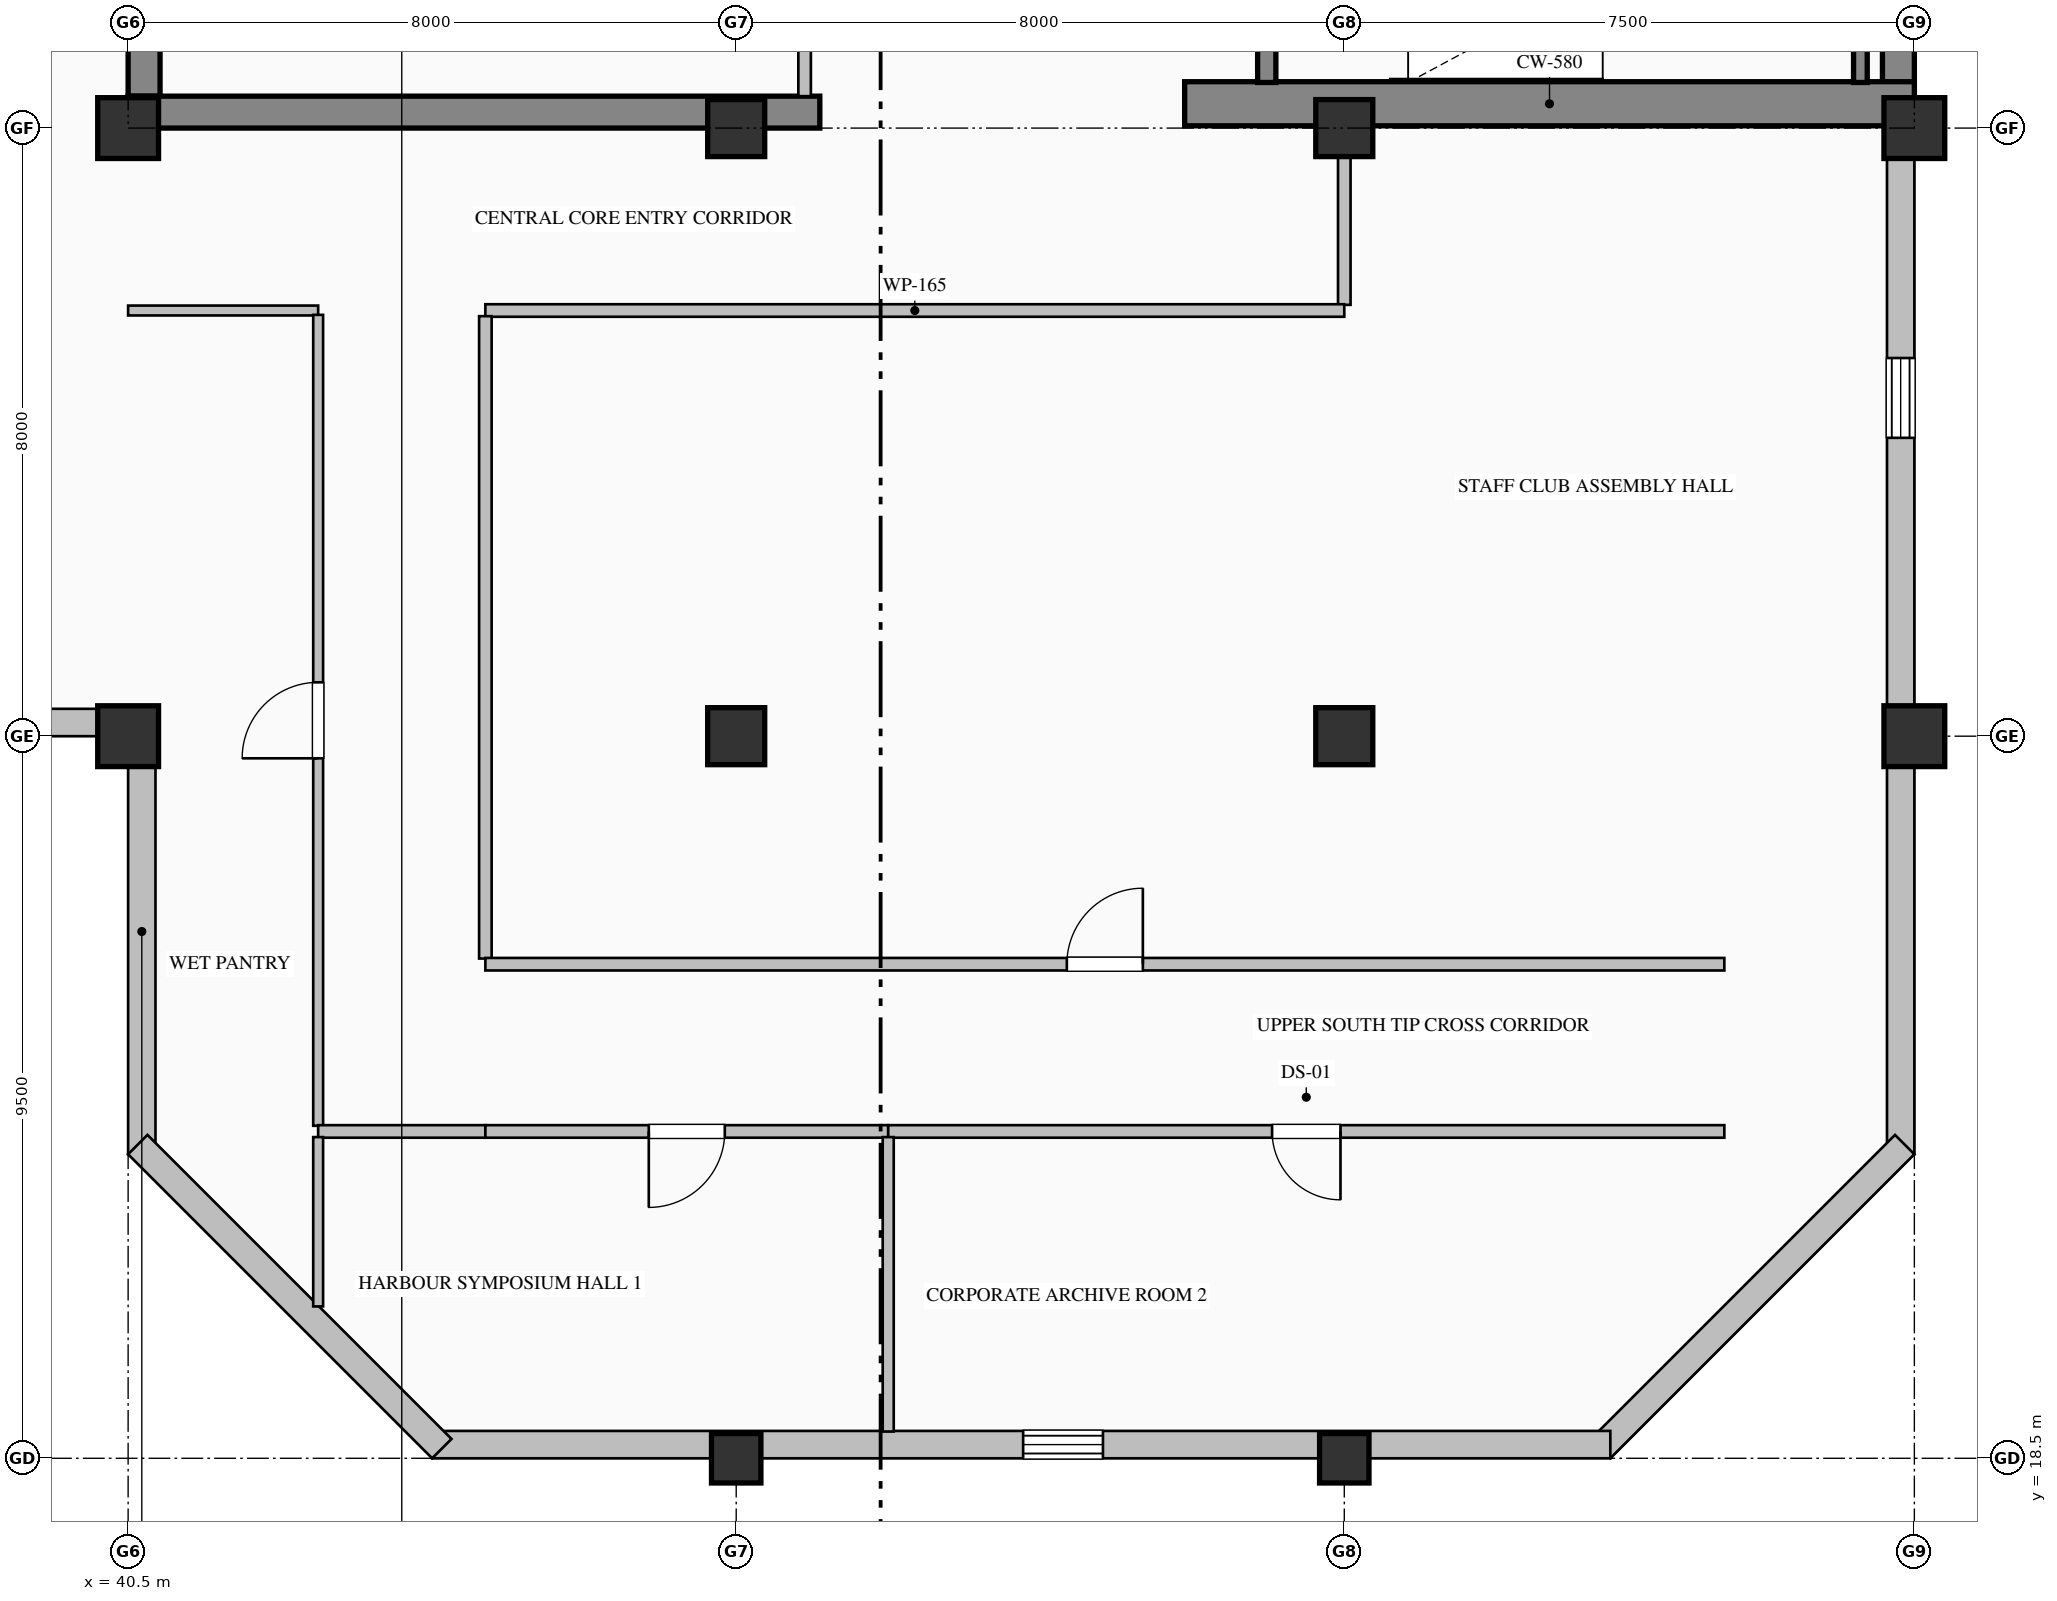
"""IFC4 building model, lengths in metres.
Left out: names, types, materials, properties, quantities, classifications, styles, units other than length and angle.
Written with IfcOpenShell. Run it as: python <this file> out.ifc"""

import sys

from ifc_helpers import new_model, si_unit, direction, frame, frame_2d, origin, origin_2d, place, context, subcontext, project, spatial, rectangle, hollow_rectangle, extrude, element, fill, save


model = new_model("IFC4")
c1 = context("Model", 3, precision=1e-05, world=origin(), true_north=direction((0.0, 1.0)))
c2 = subcontext(c1, "Body", "Model", "MODEL_VIEW")
j1 = project(units=[si_unit("LENGTHUNIT", "METRE"), si_unit("PLANEANGLEUNIT", "RADIAN")], contexts=[c1])
p1 = place(None, origin())
s1 = spatial("IfcSite", under=j1, at=p1, CompositionType="ELEMENT")
p2 = place(p1, origin())
s2 = spatial("IfcBuilding", under=s1, at=p2, CompositionType="ELEMENT")
p3 = place(p2, frame((0.0, 0.0, 315.2)))
s3 = spatial("IfcBuildingStorey", under=s2, at=p3, CompositionType="ELEMENT", Elevation=315.2)
p4 = place(p3, frame((63.79, 36.32, 0.0), z_axis=(0.0, 0.0, 1.0), x_axis=(0.0, 1.0, 0.0)))
e1 = element("IfcWall", 1, at=p4, inside=s3, PredefinedType="SHEAR", context=c2, shape_type="SweptSolid", body=[
    extrude(rectangle(XDim=15.26, YDim=0.42, at=frame_2d((7.63, 0.0))), origin(), (0.0, 0.0, 1.0), 3.785),
])
p5 = place(p3, frame((40.71, 36.42, 0.0), z_axis=(0.0, 0.0, 1.0), x_axis=(0.0, 1.0, 0.0)))
e2 = element("IfcWall", 2, at=p5, inside=s3, PredefinedType="SHEAR", context=c2, shape_type="SweptSolid", body=[
    extrude(rectangle(XDim=7.98, YDim=0.42, at=frame_2d((3.99, 0.0))), origin(), (0.0, 0.0, 1.0), 3.785),
])
p6 = place(p3, frame((40.5, 36.21, 0.0), z_axis=(0.0, 0.0, 1.0), x_axis=(1.0, 0.0, 0.0)))
e3 = element("IfcWall", 3, at=p6, inside=s3, PredefinedType="SHEAR", context=c2, shape_type="SweptSolid", body=[
    extrude(rectangle(XDim=9.1, YDim=0.42, at=frame_2d((4.55, 0.0))), origin(), (0.0, 0.0, 1.0), 3.785),
])
p7 = place(p3, frame((54.4, 36.32, 0.0), z_axis=(0.0, 0.0, 1.0), x_axis=(1.0, 0.0, 0.0)))
e4 = element("IfcWall", 4, at=p7, inside=s3, PredefinedType="SHEAR", context=c2, shape_type="SweptSolid", body=[
    extrude(rectangle(XDim=9.6, YDim=0.58, at=frame_2d((4.8, 0.0))), origin(), (0.0, 0.0, 1.0), 4.0),
])
for number, where, z_axis, x_axis in (
    (5, (40.5, 28.0, 0.0), (0.0, 0.0, 1.0), (1.0, 0.0, 0.0)),
    (6, (40.5, 36.0, 0.0), (0.0, 0.0, 1.0), (1.0, 0.0, 0.0)),
):
    element("IfcColumn", number, at=place(p3, frame(where, z_axis=z_axis, x_axis=x_axis)), inside=s3, PredefinedType="COLUMN", context=c2, shape_type="SweptSolid", body=[
        extrude(hollow_rectangle(XDim=0.8, YDim=0.8, WallThickness=0.032, at=origin_2d()), origin(), (0.0, 0.0, 1.0), 4.0),
    ])
p8 = place(p3, frame((48.5, 18.5, 0.0), z_axis=(0.0, 0.0, 1.0), x_axis=(1.0, 0.0, 0.0)))
e7 = element("IfcColumn", 7, at=p8, inside=s3, PredefinedType="COLUMN", context=c2, shape_type="SweptSolid", body=[
    extrude(hollow_rectangle(XDim=0.65, YDim=0.65, WallThickness=0.028, at=origin_2d()), origin(), (0.0, 0.0, 1.0), 4.0),
])
for number, where, z_axis, x_axis in (
    (8, (48.5, 28.0, 0.0), (0.0, 0.0, 1.0), (1.0, 0.0, 0.0)),
    (9, (48.5, 36.0, 0.0), (0.0, 0.0, 1.0), (1.0, 0.0, 0.0)),
):
    element("IfcColumn", number, at=place(p3, frame(where, z_axis=z_axis, x_axis=x_axis)), inside=s3, PredefinedType="COLUMN", context=c2, shape_type="SweptSolid", body=[
        extrude(rectangle(XDim=0.75, YDim=0.75, at=origin_2d()), origin(), (0.0, 0.0, 1.0), 4.0),
    ])
p9 = place(p3, frame((56.5, 18.5, 0.0), z_axis=(0.0, 0.0, 1.0), x_axis=(1.0, 0.0, 0.0)))
e10 = element("IfcColumn", 10, at=p9, inside=s3, PredefinedType="COLUMN", context=c2, shape_type="SweptSolid", body=[
    extrude(hollow_rectangle(XDim=0.65, YDim=0.65, WallThickness=0.028, at=origin_2d()), origin(), (0.0, 0.0, 1.0), 4.0),
])
for number, where, z_axis, x_axis in (
    (11, (56.5, 28.0, 0.0), (0.0, 0.0, 1.0), (1.0, 0.0, 0.0)),
    (12, (56.5, 36.0, 0.0), (0.0, 0.0, 1.0), (1.0, 0.0, 0.0)),
):
    element("IfcColumn", number, at=place(p3, frame(where, z_axis=z_axis, x_axis=x_axis)), inside=s3, PredefinedType="COLUMN", context=c2, shape_type="SweptSolid", body=[
        extrude(rectangle(XDim=0.75, YDim=0.75, at=origin_2d()), origin(), (0.0, 0.0, 1.0), 4.0),
    ])
for number, where, z_axis, x_axis in (
    (13, (64.0, 28.0, 0.0), (0.0, 0.0, 1.0), (1.0, 0.0, 0.0)),
    (14, (64.0, 36.0, 0.0), (0.0, 0.0, 1.0), (1.0, 0.0, 0.0)),
):
    element("IfcColumn", number, at=place(p3, frame(where, z_axis=z_axis, x_axis=x_axis)), inside=s3, PredefinedType="COLUMN", context=c2, shape_type="SweptSolid", body=[
        extrude(hollow_rectangle(XDim=0.8, YDim=0.8, WallThickness=0.032, at=origin_2d()), origin(), (0.0, 0.0, 1.0), 4.0),
    ])
p10 = place(p3, frame((40.68, 22.5, 0.0), z_axis=(0.0, 0.0, 1.0), x_axis=(0.0, 1.0, 0.0)))
e15 = element("IfcWall", 15, at=p10, inside=s3, PredefinedType="SOLIDWALL", context=c2, shape_type="SweptSolid", body=[
    extrude(rectangle(XDim=5.86, YDim=0.36, at=frame_2d((2.93, 0.0))), origin(), (0.0, 0.0, 1.0), 3.185),
])
p11 = place(p3, frame((40.52, 28.18, 0.0), z_axis=(0.0, 0.0, 1.0), x_axis=(-1.0, 0.0, 0.0)))
e16 = element("IfcWall", 16, at=p11, inside=s3, PredefinedType="SOLIDWALL", context=c2, shape_type="SweptSolid", body=[
    extrude(rectangle(XDim=20.02, YDim=0.36, at=frame_2d((10.01, 0.0))), origin(), (0.0, 0.0, 1.0), 3.185),
])
p12 = place(p11, frame((2.925, 0.0, 0.9)))
e17 = element("IfcOpeningElement", 17, at=p12, cuts=e16, PredefinedType="OPENING", context=c2, shape_type="SweptSolid", body=[
    extrude(rectangle(XDim=1.35, YDim=1.85, at=frame_2d((0.675, 0.925))), frame((0.0, 0.19, 0.0), z_axis=(0.0, -1.0, 0.0), x_axis=(1.0, 0.0, 0.0)), (0.0, 0.0, 1.0), 0.38),
])
p13 = place(p11, frame((10.275, 0.0, 0.8)))
e18 = element("IfcOpeningElement", 18, at=p13, cuts=e16, PredefinedType="OPENING", context=c2, shape_type="SweptSolid", body=[
    extrude(rectangle(XDim=1.05, YDim=2.15, at=frame_2d((0.525, 1.075))), frame((0.0, 0.19, 0.0), z_axis=(0.0, -1.0, 0.0), x_axis=(1.0, 0.0, 0.0)), (0.0, 0.0, 1.0), 0.38),
])
p14 = place(p11, frame((13.725, 0.0, 0.9)))
e19 = element("IfcOpeningElement", 19, at=p14, cuts=e16, PredefinedType="OPENING", context=c2, shape_type="SweptSolid", body=[
    extrude(rectangle(XDim=1.35, YDim=1.85, at=frame_2d((0.675, 0.925))), frame((0.0, 0.19, 0.0), z_axis=(0.0, -1.0, 0.0), x_axis=(1.0, 0.0, 0.0)), (0.0, 0.0, 1.0), 0.38),
])
p15 = place(p3, frame((63.82, 36.05, 0.0), z_axis=(0.0, 0.0, 1.0), x_axis=(0.0, -1.0, 0.0)))
e20 = element("IfcWall", 20, at=p15, inside=s3, PredefinedType="SOLIDWALL", context=c2, shape_type="SweptSolid", body=[
    extrude(rectangle(XDim=13.55, YDim=0.36, at=frame_2d((6.775, 0.0))), origin(), (0.0, 0.0, 1.0), 3.335),
])
p16 = place(p15, frame((3.075, 0.0, 0.8)))
e21 = element("IfcOpeningElement", 21, at=p16, cuts=e20, PredefinedType="OPENING", context=c2, shape_type="SweptSolid", body=[
    extrude(rectangle(XDim=1.05, YDim=2.15, at=frame_2d((0.525, 1.075))), frame((0.0, 0.19, 0.0), z_axis=(0.0, -1.0, 0.0), x_axis=(1.0, 0.0, 0.0)), (0.0, 0.0, 1.0), 0.38),
])
p17 = place(p3, frame((63.873, 22.627, 0.0), z_axis=(0.0, 0.0, 1.0), x_axis=(-0.707106781187, -0.707106781187, 0.0)))
e22 = element("IfcWall", 22, at=p17, inside=s3, PredefinedType="SOLIDWALL", context=c2, shape_type="SweptSolid", body=[
    extrude(rectangle(XDim=5.657, YDim=0.36, at=frame_2d((2.828, 0.0))), origin(), (0.0, 0.0, 1.0), 3.785),
])
p18 = place(p3, frame((60.0, 18.68, 0.0), z_axis=(0.0, 0.0, 1.0), x_axis=(-1.0, 0.0, 0.0)))
e23 = element("IfcWall", 23, at=p18, inside=s3, PredefinedType="SOLIDWALL", context=c2, shape_type="SweptSolid", body=[
    extrude(rectangle(XDim=15.5, YDim=0.36, at=frame_2d((7.75, 0.0))), origin(), (0.0, 0.0, 1.0), 3.335),
])
p19 = place(p18, frame((6.675, 0.0, 0.8)))
e24 = element("IfcOpeningElement", 24, at=p19, cuts=e23, PredefinedType="OPENING", context=c2, shape_type="SweptSolid", body=[
    extrude(rectangle(XDim=1.05, YDim=2.15, at=frame_2d((0.525, 1.075))), frame((0.0, 0.19, 0.0), z_axis=(0.0, -1.0, 0.0), x_axis=(1.0, 0.0, 0.0)), (0.0, 0.0, 1.0), 0.38),
])
p20 = place(p3, frame((44.627, 18.627, 0.0), z_axis=(0.0, 0.0, 1.0), x_axis=(-0.707106781187, 0.707106781187, 0.0)))
e25 = element("IfcWall", 25, at=p20, inside=s3, PredefinedType="SOLIDWALL", context=c2, shape_type="SweptSolid", body=[
    extrude(rectangle(XDim=5.657, YDim=0.36, at=frame_2d((2.828, 0.0))), origin(), (0.0, 0.0, 1.0), 3.785),
])
p21 = place(p3, frame((55.48, 39.75, 0.0), z_axis=(0.0, 0.0, 1.0), x_axis=(0.0, -1.0, 0.0)))
e26 = element("IfcWall", 26, at=p21, inside=s3, PredefinedType="SOLIDWALL", context=c2, shape_type="SweptSolid", body=[
    extrude(rectangle(XDim=3.15, YDim=0.24, at=frame_2d((1.575, 0.0))), origin(), (0.0, 0.0, 1.0), 4.0),
])
p22 = place(p21, frame((1.0, 0.0, 0.0)))
e27 = element("IfcOpeningElement", 27, at=p22, cuts=e26, PredefinedType="OPENING", context=c2, shape_type="SweptSolid", body=[
    extrude(rectangle(XDim=1.15, YDim=2.2, at=frame_2d((0.575, 1.1))), frame((0.0, 0.13, 0.0), z_axis=(0.0, -1.0, 0.0), x_axis=(1.0, 0.0, 0.0)), (0.0, 0.0, 1.0), 0.26),
])
p23 = place(p3, frame((63.29, 36.6, 0.0), z_axis=(0.0, 0.0, 1.0), x_axis=(0.0, 1.0, 0.0)))
e28 = element("IfcWall", 28, at=p23, inside=s3, PredefinedType="SOLIDWALL", context=c2, shape_type="SweptSolid", body=[
    extrude(rectangle(XDim=3.15, YDim=0.18, at=frame_2d((1.575, 0.0))), origin(), (0.0, 0.0, 1.0), 4.0),
])
p24 = place(p3, frame((49.4, 36.42, 0.0), z_axis=(0.0, 0.0, 1.0), x_axis=(0.0, 1.0, 0.0)))
e29 = element("IfcWall", 29, at=p24, inside=s3, PredefinedType="PARTITIONING", context=c2, shape_type="SweptSolid", body=[
    extrude(rectangle(XDim=7.73, YDim=0.165, at=frame_2d((3.865, 0.0))), origin(), (0.0, 0.0, 1.0), 3.027),
])
p25 = place(p24, frame((3.365, 0.0, 0.0)))
e30 = element("IfcOpeningElement", 30, at=p25, cuts=e29, PredefinedType="OPENING", context=c2, shape_type="SweptSolid", body=[
    extrude(rectangle(XDim=1.0, YDim=2.15, at=frame_2d((0.5, 1.075))), frame((0.0, 0.093, 0.0), z_axis=(0.0, -1.0, 0.0), x_axis=(1.0, 0.0, 0.0)), (0.0, 0.0, 1.0), 0.185),
])
p26 = place(p3, frame((56.5, 36.0, 0.0), z_axis=(0.0, 0.0, 1.0), x_axis=(0.0, -1.0, 0.0)))
e31 = element("IfcWall", 31, at=p26, inside=s3, PredefinedType="PARTITIONING", context=c2, shape_type="SweptSolid", body=[
    extrude(rectangle(XDim=2.325, YDim=0.165, at=frame_2d((1.163, 0.0))), origin(), (0.0, 0.0, 1.0), 3.177),
])
p27 = place(p3, frame((56.5, 33.6, 0.0), z_axis=(0.0, 0.0, 1.0), x_axis=(-1.0, 0.0, 0.0)))
e32 = element("IfcWall", 32, at=p27, inside=s3, PredefinedType="PARTITIONING", context=c2, shape_type="SweptSolid", body=[
    extrude(rectangle(XDim=11.3, YDim=0.165, at=frame_2d((5.65, 0.0))), origin(), (0.0, 0.0, 1.0), 3.785),
])
p28 = place(p3, frame((43.0, 33.6, 0.0), z_axis=(0.0, 0.0, 1.0), x_axis=(-1.0, 0.0, 0.0)))
e33 = element("IfcWall", 33, at=p28, inside=s3, PredefinedType="PARTITIONING", context=c2, shape_type="SweptSolid", body=[
    extrude(rectangle(XDim=2.5, YDim=0.13, at=frame_2d((1.25, 0.0))), origin(), (0.0, 0.0, 1.0), 3.785),
])
p29 = place(p3, frame((45.2, 33.525, 0.0), z_axis=(0.0, 0.0, 1.0), x_axis=(0.0, -1.0, 0.0)))
e34 = element("IfcWall", 34, at=p29, inside=s3, PredefinedType="PARTITIONING", context=c2, shape_type="SweptSolid", body=[
    extrude(rectangle(XDim=8.451, YDim=0.165, at=frame_2d((4.226, 0.0))), origin(), (0.0, 0.0, 1.0), 3.785),
])
p30 = place(p3, frame((43.0, 22.875, 0.0), z_axis=(0.0, 0.0, 1.0), x_axis=(0.0, 1.0, 0.0)))
e35 = element("IfcWall", 35, at=p30, inside=s3, PredefinedType="PARTITIONING", context=c2, shape_type="SweptSolid", body=[
    extrude(rectangle(XDim=10.668, YDim=0.13, at=frame_2d((5.334, 0.0))), origin(), (0.0, 0.0, 1.0), 3.785),
])
p31 = place(p30, frame((4.834, 0.0, 0.0)))
e36 = element("IfcOpeningElement", 36, at=p31, cuts=e35, PredefinedType="OPENING", context=c2, shape_type="SweptSolid", body=[
    extrude(rectangle(XDim=1.0, YDim=2.15, at=frame_2d((0.5, 1.075))), frame((0.0, 0.075, 0.0), z_axis=(0.0, -1.0, 0.0), x_axis=(1.0, 0.0, 0.0)), (0.0, 0.0, 1.0), 0.15),
])
p32 = place(p3, frame((45.2, 22.8, 0.0), z_axis=(0.0, 0.0, 1.0), x_axis=(-1.0, 0.0, 0.0)))
e37 = element("IfcWall", 37, at=p32, inside=s3, PredefinedType="PARTITIONING", context=c2, shape_type="SweptSolid", body=[
    extrude(rectangle(XDim=2.2, YDim=0.165, at=frame_2d((1.1, 0.0))), origin(), (0.0, 0.0, 1.0), 3.785),
])
p33 = place(p3, frame((45.2, 25.0, 0.0), z_axis=(0.0, 0.0, 1.0), x_axis=(1.0, 0.0, 0.0)))
e38 = element("IfcWall", 38, at=p33, inside=s3, PredefinedType="PARTITIONING", context=c2, shape_type="SweptSolid", body=[
    extrude(rectangle(XDim=16.3, YDim=0.165, at=frame_2d((8.15, 0.0))), origin(), (0.0, 0.0, 1.0), 3.785),
])
p34 = place(p33, frame((7.65, 0.0, 0.0)))
e39 = element("IfcOpeningElement", 39, at=p34, cuts=e38, PredefinedType="OPENING", context=c2, shape_type="SweptSolid", body=[
    extrude(rectangle(XDim=1.0, YDim=2.15, at=frame_2d((0.5, 1.075))), frame((0.0, 0.093, 0.0), z_axis=(0.0, -1.0, 0.0), x_axis=(1.0, 0.0, 0.0)), (0.0, 0.0, 1.0), 0.185),
])
p35 = place(p3, frame((50.5, 22.8, 0.0), z_axis=(0.0, 0.0, 1.0), x_axis=(-1.0, 0.0, 0.0)))
e40 = element("IfcWall", 40, at=p35, inside=s3, PredefinedType="PARTITIONING", context=c2, shape_type="SweptSolid", body=[
    extrude(rectangle(XDim=5.3, YDim=0.165, at=frame_2d((2.65, 0.0))), origin(), (0.0, 0.0, 1.0), 3.785),
])
p36 = place(p35, frame((2.15, 0.0, 0.0)))
e41 = element("IfcOpeningElement", 41, at=p36, cuts=e40, PredefinedType="OPENING", context=c2, shape_type="SweptSolid", body=[
    extrude(rectangle(XDim=1.0, YDim=2.15, at=frame_2d((0.5, 1.075))), frame((0.0, 0.093, 0.0), z_axis=(0.0, -1.0, 0.0), x_axis=(1.0, 0.0, 0.0)), (0.0, 0.0, 1.0), 0.185),
])
p37 = place(p3, frame((61.5, 22.8, 0.0), z_axis=(0.0, 0.0, 1.0), x_axis=(-1.0, 0.0, 0.0)))
e42 = element("IfcWall", 42, at=p37, inside=s3, PredefinedType="PARTITIONING", context=c2, shape_type="SweptSolid", body=[
    extrude(rectangle(XDim=11.0, YDim=0.165, at=frame_2d((5.5, 0.0))), origin(), (0.0, 0.0, 1.0), 3.785),
])
p38 = place(p37, frame((5.05, 0.0, 0.0)))
e43 = element("IfcOpeningElement", 43, at=p38, cuts=e42, PredefinedType="OPENING", context=c2, shape_type="SweptSolid", body=[
    extrude(rectangle(XDim=0.9, YDim=2.15, at=frame_2d((0.45, 1.075))), frame((0.0, 0.093, 0.0), z_axis=(0.0, -1.0, 0.0), x_axis=(1.0, 0.0, 0.0)), (0.0, 0.0, 1.0), 0.185),
])
p39 = place(p3, frame((43.0, 22.726, 0.0), z_axis=(0.0, 0.0, 1.0), x_axis=(0.0, -1.0, 0.0)))
e44 = element("IfcWall", 44, at=p39, inside=s3, PredefinedType="PARTITIONING", context=c2, shape_type="SweptSolid", body=[
    extrude(rectangle(XDim=2.228, YDim=0.13, at=frame_2d((1.114, 0.0))), origin(), (0.0, 0.0, 1.0), 3.785),
])
p40 = place(p3, frame((50.5, 22.726, 0.0), z_axis=(0.0, 0.0, 1.0), x_axis=(0.0, -1.0, 0.0)))
e45 = element("IfcWall", 45, at=p40, inside=s3, PredefinedType="PARTITIONING", context=c2, shape_type="SweptSolid", body=[
    extrude(rectangle(XDim=3.874, YDim=0.145, at=frame_2d((1.937, 0.0))), origin(), (0.0, 0.0, 1.0), 3.785),
])
p41 = place(p16, origin())
e46 = element("IfcWindow", 46, at=p41, inside=s3, PartitioningType="SINGLE_PANEL", PredefinedType="WINDOW", context=c2, shape_type="SweptSolid", body=[
    extrude(rectangle(XDim=1.05, YDim=2.15, at=frame_2d((0.525, 1.075))), frame((0.0, 0.15, 0.0), z_axis=(0.0, -1.0, 0.0), x_axis=(1.0, 0.0, 0.0)), (0.0, 0.0, 1.0), 0.06),
])
fill(e21, e46)
p42 = place(p19, origin())
e47 = element("IfcWindow", 47, at=p42, inside=s3, PartitioningType="SINGLE_PANEL", PredefinedType="WINDOW", context=c2, shape_type="SweptSolid", body=[
    extrude(rectangle(XDim=1.05, YDim=2.15, at=frame_2d((0.525, 1.075))), frame((0.0, 0.15, 0.0), z_axis=(0.0, -1.0, 0.0), x_axis=(1.0, 0.0, 0.0)), (0.0, 0.0, 1.0), 0.06),
])
fill(e24, e47)
p43 = place(p34, origin())
e48 = element("IfcDoor", 48, at=p43, inside=s3, OperationType="SINGLE_SWING_RIGHT", PredefinedType="DOOR", context=c2, shape_type="SweptSolid", body=[
    extrude(rectangle(XDim=1.0, YDim=2.15, at=frame_2d((0.5, 1.075))), frame((0.0, 0.025, 0.0), z_axis=(0.0, -1.0, 0.0), x_axis=(1.0, 0.0, 0.0)), (0.0, 0.0, 1.0), 0.05),
])
fill(e39, e48)
p44 = place(p31, origin())
e49 = element("IfcDoor", 49, at=p44, inside=s3, OperationType="SINGLE_SWING_LEFT", PredefinedType="DOOR", context=c2, shape_type="SweptSolid", body=[
    extrude(rectangle(XDim=1.0, YDim=2.15, at=frame_2d((0.5, 1.075))), frame((0.0, 0.025, 0.0), z_axis=(0.0, -1.0, 0.0), x_axis=(1.0, 0.0, 0.0)), (0.0, 0.0, 1.0), 0.05),
])
fill(e36, e49)
p45 = place(p36, origin())
e50 = element("IfcDoor", 50, at=p45, inside=s3, OperationType="SINGLE_SWING_RIGHT", PredefinedType="DOOR", context=c2, shape_type="SweptSolid", body=[
    extrude(rectangle(XDim=1.0, YDim=2.15, at=frame_2d((0.5, 1.075))), frame((0.0, 0.025, 0.0), z_axis=(0.0, -1.0, 0.0), x_axis=(1.0, 0.0, 0.0)), (0.0, 0.0, 1.0), 0.05),
])
fill(e41, e50)
p46 = place(p38, origin())
e51 = element("IfcDoor", 51, at=p46, inside=s3, OperationType="SINGLE_SWING_LEFT", PredefinedType="DOOR", context=c2, shape_type="SweptSolid", body=[
    extrude(rectangle(XDim=0.9, YDim=2.15, at=frame_2d((0.45, 1.075))), frame((0.0, 0.025, 0.0), z_axis=(0.0, -1.0, 0.0), x_axis=(1.0, 0.0, 0.0)), (0.0, 0.0, 1.0), 0.05),
])
fill(e43, e51)
save(model, sys.argv[1])
